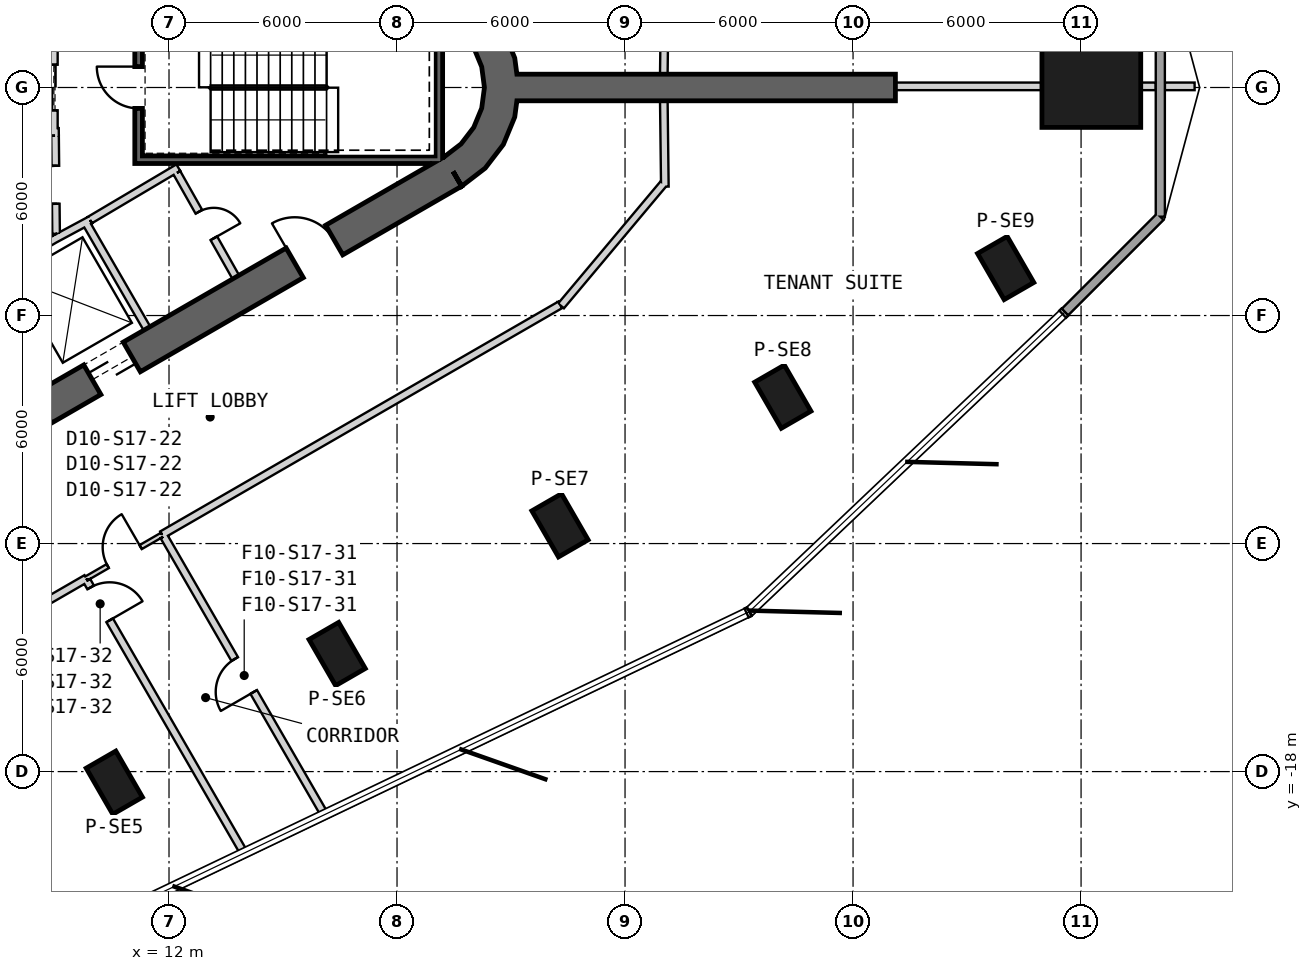
"""IFC4 building model, lengths in metres.
Left out: names, types, materials, properties, quantities, classifications, styles, units other than length and angle.
Written with IfcOpenShell. Run it as: python <this file> out.ifc"""

import sys

from ifc_helpers import new_model, si_unit, direction, frame, frame_2d, origin, origin_2d, place, context, subcontext, project, spatial, polyline, rectangle, outline, extrude, element, fill, save


model = new_model("IFC4")
c1 = context("Model", 3, precision=1e-05, world=origin(), true_north=direction((0.0, 1.0)))
c2 = subcontext(c1, "Body", "Model", "MODEL_VIEW")
j1 = project(units=[si_unit("LENGTHUNIT", "METRE"), si_unit("PLANEANGLEUNIT", "RADIAN")], contexts=[c1])
p1 = place(None, origin())
s1 = spatial("IfcSite", under=j1, at=p1, CompositionType="ELEMENT")
p2 = place(p1, origin())
s2 = spatial("IfcBuilding", under=s1, at=p2, CompositionType="ELEMENT")
p3 = place(p2, frame((0.0, 0.0, 265.2)))
s3 = spatial("IfcBuildingStorey", under=s2, at=p3, CompositionType="ELEMENT", Elevation=265.2)
p4 = place(p3, frame((36.27, 0.0, 0.0), z_axis=(0.0, 0.0, 1.0), x_axis=(1.0, 0.0, 0.0)))
e1 = element("IfcColumn", 1, at=p4, inside=s3, PredefinedType="COLUMN", context=c2, shape_type="SweptSolid", body=[
    extrude(rectangle(XDim=2.6, YDim=2.1, at=origin_2d()), origin(), (0.0, 0.0, 1.0), 4.0),
])
for number, where, z_axis, x_axis in (
    (2, (10.561, -18.292, 0.0), (0.0, 0.0, 1.0), (0.5, -0.866, 0.0)),
    (3, (16.425, -14.906, 0.0), (0.0, 0.0, 1.0), (0.5, -0.866, 0.0)),
    (4, (22.288, -11.521, 0.0), (0.0, 0.0, 1.0), (0.5, -0.866, 0.0)),
    (5, (28.152, -8.135, 0.0), (0.0, 0.0, 1.0), (0.5, -0.866, 0.0)),
    (6, (34.016, -4.75, 0.0), (0.0, 0.0, 1.0), (0.5, -0.866, 0.0)),
):
    element("IfcColumn", number, at=place(p3, frame(where, z_axis=z_axis, x_axis=x_axis)), inside=s3, PredefinedType="COLUMN", context=c2, shape_type="SweptSolid", body=[
        extrude(rectangle(XDim=1.4, YDim=0.9, at=origin_2d()), origin(), (0.0, 0.0, 1.0), 4.0),
    ])
p5 = place(p3, frame((-7.825, -17.97, 0.0), z_axis=(0.0, 0.0, 1.0), x_axis=(0.866028369851, 0.499994862586, 0.0)))
e7 = element("IfcWall", 7, at=p5, inside=s3, PredefinedType="SHEAR", context=c2, shape_type="SweptSolid", body=[
    extrude(rectangle(XDim=31.523, YDim=0.9, at=frame_2d((15.762, 0.0))), origin(), (0.0, 0.0, 1.0), 4.0),
])
p6 = place(p5, frame((7.062, 0.0, 0.0)))
e8 = element("IfcOpeningElement", 8, at=p6, cuts=e7, PredefinedType="OPENING", context=c2, shape_type="SweptSolid", body=[
    extrude(rectangle(XDim=1.2, YDim=2.4, at=frame_2d((0.6, 1.2))), frame((0.0, 0.46, 0.0), z_axis=(0.0, -1.0, 0.0), x_axis=(1.0, 0.0, 0.0)), (0.0, 0.0, 1.0), 0.92),
])
p7 = place(p5, frame((9.762, 0.0, 0.0)))
e9 = element("IfcOpeningElement", 9, at=p7, cuts=e7, PredefinedType="OPENING", context=c2, shape_type="SweptSolid", body=[
    extrude(rectangle(XDim=1.2, YDim=2.4, at=frame_2d((0.6, 1.2))), frame((0.0, 0.46, 0.0), z_axis=(0.0, -1.0, 0.0), x_axis=(1.0, 0.0, 0.0)), (0.0, 0.0, 1.0), 0.92),
])
p8 = place(p5, frame((12.462, 0.0, 0.0)))
e10 = element("IfcOpeningElement", 10, at=p8, cuts=e7, PredefinedType="OPENING", context=c2, shape_type="SweptSolid", body=[
    extrude(rectangle(XDim=1.2, YDim=2.4, at=frame_2d((0.6, 1.2))), frame((0.0, 0.46, 0.0), z_axis=(0.0, -1.0, 0.0), x_axis=(1.0, 0.0, 0.0)), (0.0, 0.0, 1.0), 0.92),
])
p9 = place(p5, frame((15.162, 0.0, 0.0)))
e11 = element("IfcOpeningElement", 11, at=p9, cuts=e7, PredefinedType="OPENING", context=c2, shape_type="SweptSolid", body=[
    extrude(rectangle(XDim=1.2, YDim=2.4, at=frame_2d((0.6, 1.2))), frame((0.0, 0.46, 0.0), z_axis=(0.0, -1.0, 0.0), x_axis=(1.0, 0.0, 0.0)), (0.0, 0.0, 1.0), 0.92),
])
p10 = place(p5, frame((17.862, 0.0, 0.0)))
e12 = element("IfcOpeningElement", 12, at=p10, cuts=e7, PredefinedType="OPENING", context=c2, shape_type="SweptSolid", body=[
    extrude(rectangle(XDim=1.2, YDim=2.4, at=frame_2d((0.6, 1.2))), frame((0.0, 0.46, 0.0), z_axis=(0.0, -1.0, 0.0), x_axis=(1.0, 0.0, 0.0)), (0.0, 0.0, 1.0), 0.92),
])
p11 = place(p5, frame((20.562, 0.0, 0.0)))
e13 = element("IfcOpeningElement", 13, at=p11, cuts=e7, PredefinedType="OPENING", context=c2, shape_type="SweptSolid", body=[
    extrude(rectangle(XDim=1.2, YDim=2.4, at=frame_2d((0.6, 1.2))), frame((0.0, 0.46, 0.0), z_axis=(0.0, -1.0, 0.0), x_axis=(1.0, 0.0, 0.0)), (0.0, 0.0, 1.0), 0.92),
])
p12 = place(p5, frame((26.712, 0.0, 0.0)))
e14 = element("IfcOpeningElement", 14, at=p12, cuts=e7, PredefinedType="OPENING", context=c2, shape_type="SweptSolid", body=[
    extrude(rectangle(XDim=1.2, YDim=2.4, at=frame_2d((0.6, 1.2))), frame((0.0, 0.46, 0.0), z_axis=(0.0, -1.0, 0.0), x_axis=(1.0, 0.0, 0.0)), (0.0, 0.0, 1.0), 0.92),
])
p13 = place(p5, frame((3.612, 0.0, 0.0)))
e15 = element("IfcOpeningElement", 15, at=p13, cuts=e7, PredefinedType="OPENING", context=c2, shape_type="SweptSolid", body=[
    extrude(rectangle(XDim=1.2, YDim=2.4, at=frame_2d((0.6, 1.2))), frame((0.0, 0.46, 0.0), z_axis=(0.0, -1.0, 0.0), x_axis=(1.0, 0.0, 0.0)), (0.0, 0.0, 1.0), 0.92),
])
p14 = place(p3, origin())
e16 = element("IfcWall", 16, at=p14, inside=s3, PredefinedType="SHEAR", context=c2, shape_type="SweptSolid", body=[
    extrude(outline(polyline([(19.7, -2.598), (20.321, -2.121), (20.798, -1.5), (21.098, -0.777), (21.2, 0.0), (21.098, 0.777), (20.798, 1.5), (20.321, 2.121), (19.7, 2.598), (19.25, 1.819), (19.685, 1.485), (20.019, 1.05), (20.229, 0.543), (20.3, 0.0), (20.229, -0.543), (20.019, -1.05), (19.685, -1.485), (19.25, -1.819), (19.7, -2.598)])), origin(), (0.0, 0.0, 1.0), 4.0),
])
p15 = place(p3, frame((21.15, 0.0, 0.0), z_axis=(0.0, 0.0, 1.0), x_axis=(1.0, 0.0, 0.0)))
e17 = element("IfcWall", 17, at=p15, inside=s3, PredefinedType="SHEAR", context=c2, shape_type="SweptSolid", body=[
    extrude(rectangle(XDim=9.965, YDim=0.7, at=frame_2d((4.982, 0.0))), origin(), (0.0, 0.0, 1.0), 4.0),
])
p16 = place(p3, frame((35.575, -5.909, 0.0), z_axis=(0.0, 0.0, 1.0), x_axis=(0.707106781187, 0.707106781187, 0.0)))
e18 = element("IfcWall", 18, at=p16, inside=s3, PredefinedType="SOLIDWALL", context=c2, shape_type="SweptSolid", body=[
    extrude(rectangle(XDim=3.55, YDim=0.24, at=frame_2d((1.775, 0.0))), origin(), (0.0, 0.0, 1.0), 3.7),
])
p17 = place(p3, frame((38.085, -3.399, 0.0), z_axis=(0.0, 0.0, 1.0), x_axis=(0.0, 1.0, 0.0)))
e19 = element("IfcWall", 19, at=p17, inside=s3, PredefinedType="SOLIDWALL", context=c2, shape_type="SweptSolid", body=[
    extrude(rectangle(XDim=6.798, YDim=0.24, at=frame_2d((3.399, 0.0))), origin(), (0.0, 0.0, 1.0), 3.7),
])
p18 = place(p3, frame((9.795, -3.525, 0.0), z_axis=(0.0, 0.0, 1.0), x_axis=(0.499984717929, -0.866034226713, 0.0)))
e20 = element("IfcWall", 20, at=p18, inside=s3, PredefinedType="PLUMBINGWALL", context=c2, shape_type="SweptSolid", body=[
    extrude(rectangle(XDim=3.25, YDim=0.2, at=frame_2d((1.625, 0.0))), origin(), (0.0, 0.0, 1.0), 3.7),
])
p19 = place(p3, frame((8.974, -3.999, 0.0), z_axis=(0.0, 0.0, 1.0), x_axis=(0.880907015104, 0.473289373154, 0.0)))
e21 = element("IfcWall", 21, at=p19, inside=s3, PredefinedType="PLUMBINGWALL", context=c2, shape_type="SweptSolid", body=[
    extrude(rectangle(XDim=1.078, YDim=0.2, at=frame_2d((0.539, 0.0))), origin(), (0.0, 0.0, 1.0), 3.7),
])
p20 = place(p3, frame((7.493, -4.878, 0.0), z_axis=(0.0, 0.0, 1.0), x_axis=(0.859981807212, 0.510324691999, 0.0)))
e22 = element("IfcWall", 22, at=p20, inside=s3, PredefinedType="PLUMBINGWALL", context=c2, shape_type="SweptSolid", body=[
    extrude(rectangle(XDim=1.845, YDim=0.2, at=frame_2d((0.922, 0.0))), origin(), (0.0, 0.0, 1.0), 3.7),
])
p21 = place(p3, frame((19.1, -2.0, -0.3), z_axis=(0.0, 0.0, 1.0), x_axis=(0.0, 1.0, 0.0)))
e23 = element("IfcWall", 23, at=p21, inside=s3, PredefinedType="SHEAR", context=c2, shape_type="SweptSolid", body=[
    extrude(rectangle(XDim=3.8, YDim=0.2, at=frame_2d((1.9, 0.0))), origin(), (0.0, 0.0, 1.0), 4.0),
])
p22 = place(p3, frame((11.1, -1.9, -0.3), z_axis=(0.0, 0.0, 1.0), x_axis=(1.0, 0.0, 0.0)))
e24 = element("IfcWall", 24, at=p22, inside=s3, PredefinedType="SHEAR", context=c2, shape_type="SweptSolid", body=[
    extrude(rectangle(XDim=7.9, YDim=0.2, at=frame_2d((3.95, 0.0))), origin(), (0.0, 0.0, 1.0), 4.0),
])
p23 = place(p3, frame((11.2, -1.8, -0.3), z_axis=(0.0, 0.0, 1.0), x_axis=(0.0, 1.0, 0.0)))
e25 = element("IfcWall", 25, at=p23, inside=s3, PredefinedType="SHEAR", context=c2, shape_type="SweptSolid", body=[
    extrude(rectangle(XDim=3.6, YDim=0.2, at=frame_2d((1.8, 0.0))), origin(), (0.0, 0.0, 1.0), 4.0),
])
p24 = place(p23, frame((1.25, 0.0, 0.3)))
e26 = element("IfcOpeningElement", 26, at=p24, cuts=e25, PredefinedType="OPENING", context=c2, shape_type="SweptSolid", body=[
    extrude(rectangle(XDim=1.1, YDim=2.1, at=frame_2d((0.55, 1.05))), frame((0.0, 0.11, 0.0), z_axis=(0.0, -1.0, 0.0), x_axis=(1.0, 0.0, 0.0)), (0.0, 0.0, 1.0), 0.22),
])
p25 = place(p3, frame((8.97, 1.2, 0.0), z_axis=(0.0, 0.0, 1.0), x_axis=(0.0, -1.0, 0.0)))
e27 = element("IfcWall", 27, at=p25, inside=s3, PredefinedType="PLUMBINGWALL", context=c2, shape_type="SweptSolid", body=[
    extrude(rectangle(XDim=2.4, YDim=0.2, at=frame_2d((1.2, 0.0))), origin(), (0.0, 0.0, 1.0), 3.7),
])
p26 = place(p25, frame((0.6, 0.0, 0.0)))
e28 = element("IfcOpeningElement", 28, at=p26, cuts=e27, PredefinedType="OPENING", context=c2, shape_type="SweptSolid", body=[
    extrude(rectangle(XDim=1.2, YDim=2.4, at=frame_2d((0.6, 1.2))), frame((0.0, 0.11, 0.0), z_axis=(0.0, -1.0, 0.0), x_axis=(1.0, 0.0, 0.0)), (0.0, 0.0, 1.0), 0.22),
])
p27 = place(p3, frame((5.9, -1.201, 0.0), z_axis=(0.0, 0.0, 1.0), x_axis=(0.999950064753, 0.009993397809, 0.0)))
e29 = element("IfcWall", 29, at=p27, inside=s3, PredefinedType="PLUMBINGWALL", context=c2, shape_type="SweptSolid", body=[
    extrude(rectangle(XDim=3.2, YDim=0.2, at=frame_2d((1.6, 0.0))), origin(), (0.0, 0.0, 1.0), 3.7),
])
p28 = place(p3, frame((12.245, -2.109, 0.0), z_axis=(0.0, 0.0, 1.0), x_axis=(-0.860414880418, -0.509594185166, 0.0)))
e30 = element("IfcWall", 30, at=p28, inside=s3, PredefinedType="PARTITIONING", context=c2, shape_type="SweptSolid", body=[
    extrude(rectangle(XDim=2.7, YDim=0.2, at=frame_2d((1.35, 0.0))), origin(), (0.0, 0.0, 1.0), 3.7),
])
p29 = place(p3, frame((13.758, -4.99, 0.0), z_axis=(0.0, 0.0, 1.0), x_axis=(-0.491993409184, 0.87059892334, 0.0)))
e31 = element("IfcWall", 31, at=p29, inside=s3, PredefinedType="PARTITIONING", context=c2, shape_type="SweptSolid", body=[
    extrude(rectangle(XDim=3.15, YDim=0.2, at=frame_2d((1.575, 0.0))), origin(), (0.0, 0.0, 1.0), 3.7),
])
p30 = place(p29, frame((1.175, 0.0, 0.0)))
e32 = element("IfcOpeningElement", 32, at=p30, cuts=e31, PredefinedType="OPENING", context=c2, shape_type="SweptSolid", body=[
    extrude(rectangle(XDim=0.8, YDim=2.1, at=frame_2d((0.4, 1.05))), frame((0.0, 0.11, 0.0), z_axis=(0.0, -1.0, 0.0), x_axis=(1.0, 0.0, 0.0)), (0.0, 0.0, 1.0), 0.22),
])
p31 = place(p3, frame((9.029, -3.851, 0.0), z_axis=(0.0, 0.0, 1.0), x_axis=(-0.010783593937, 0.99994185536, 0.0)))
e33 = element("IfcWall", 33, at=p31, inside=s3, PredefinedType="PARTITIONING", context=c2, shape_type="SweptSolid", body=[
    extrude(rectangle(XDim=2.581, YDim=0.2, at=frame_2d((1.291, 0.0))), origin(), (0.0, 0.0, 1.0), 3.7),
])
p32 = place(p31, frame((0.791, 0.0, 0.0)))
e34 = element("IfcOpeningElement", 34, at=p32, cuts=e33, PredefinedType="OPENING", context=c2, shape_type="SweptSolid", body=[
    extrude(rectangle(XDim=1.0, YDim=2.1, at=frame_2d((0.5, 1.05))), frame((0.0, 0.11, 0.0), z_axis=(0.0, -1.0, 0.0), x_axis=(1.0, 0.0, 0.0)), (0.0, 0.0, 1.0), 0.22),
])
p33 = place(p3, frame((25.021, 0.35, 0.0), z_axis=(0.0, 0.0, 1.0), x_axis=(0.012014998271, 0.999927817303, 0.0)))
e35 = element("IfcWall", 35, at=p33, inside=s3, PredefinedType="PARTITIONING", context=c2, shape_type="SweptSolid", body=[
    extrude(rectangle(XDim=2.093, YDim=0.2, at=frame_2d((1.046, 0.0))), origin(), (0.0, 0.0, 1.0), 3.7),
])
p34 = place(p3, frame((9.825, -12.918, 0.0), z_axis=(0.0, 0.0, 1.0), x_axis=(0.86602648383, 0.499998129301, 0.0)))
e36 = element("IfcWall", 36, at=p34, inside=s3, PredefinedType="PARTITIONING", context=c2, shape_type="SweptSolid", body=[
    extrude(rectangle(XDim=2.3, YDim=0.12, at=frame_2d((1.15, 0.0))), origin(), (0.0, 0.0, 1.0), 3.7),
])
p35 = place(p34, frame((0.65, 0.0, 0.0)))
e37 = element("IfcOpeningElement", 37, at=p35, cuts=e36, PredefinedType="OPENING", context=c2, shape_type="SweptSolid", body=[
    extrude(rectangle(XDim=1.0, YDim=2.1, at=frame_2d((0.5, 1.05))), frame((0.0, 0.07, 0.0), z_axis=(0.0, -1.0, 0.0), x_axis=(1.0, 0.0, 0.0)), (0.0, 0.0, 1.0), 0.14),
])
p36 = place(p3, frame((25.048, -2.608, 0.0), z_axis=(0.0, 0.0, 1.0), x_axis=(-0.012000433251, 0.999927992208, 0.0)))
e38 = element("IfcWall", 38, at=p36, inside=s3, PredefinedType="PARTITIONING", context=c2, shape_type="SweptSolid", body=[
    extrude(rectangle(XDim=2.258, YDim=0.2, at=frame_2d((1.129, 0.0))), origin(), (0.0, 0.0, 1.0), 3.7),
])
p37 = place(p3, frame((22.315, -5.746, 0.0), z_axis=(0.0, 0.0, 1.0), x_axis=(0.642828004621, 0.76601054593, 0.0)))
e39 = element("IfcWall", 39, at=p37, inside=s3, PredefinedType="PARTITIONING", context=c2, shape_type="SweptSolid", body=[
    extrude(rectangle(XDim=4.2, YDim=0.2, at=frame_2d((2.1, 0.0))), origin(), (0.0, 0.0, 1.0), 2.88),
])
p38 = place(p3, frame((-6.366, -22.266, 0.0), z_axis=(0.0, 0.0, 1.0), x_axis=(0.866027932408, 0.49999562027, 0.0)))
e40 = element("IfcWall", 40, at=p38, inside=s3, PredefinedType="PARTITIONING", context=c2, shape_type="SweptSolid", body=[
    extrude(rectangle(XDim=18.697, YDim=0.2, at=frame_2d((9.348, 0.0))), origin(), (0.0, 0.0, 1.0), 2.98),
])
p39 = place(p3, frame((11.817, -11.768, 0.0), z_axis=(0.0, 0.0, 1.0), x_axis=(0.866029971876, 0.49999208775, 0.0)))
e41 = element("IfcWall", 41, at=p39, inside=s3, PredefinedType="PARTITIONING", context=c2, shape_type="SweptSolid", body=[
    extrude(rectangle(XDim=12.096, YDim=0.2, at=frame_2d((6.048, 0.0))), origin(), (0.0, 0.0, 1.0), 2.98),
])
p40 = place(p3, frame((38.988, 0.03, 0.0), z_axis=(0.0, 0.0, 1.0), x_axis=(-1.0, 0.0, 0.0)))
e42 = element("IfcWall", 42, at=p40, inside=s3, PredefinedType="PARTITIONING", context=c2, shape_type="SweptSolid", body=[
    extrude(rectangle(XDim=0.783, YDim=0.2, at=frame_2d((0.392, 0.0))), origin(), (0.0, 0.0, 1.0), 3.7),
])
p41 = place(p3, frame((37.965, 0.03, 0.0), z_axis=(0.0, 0.0, 1.0), x_axis=(-1.0, 0.0, 0.0)))
e43 = element("IfcWall", 43, at=p41, inside=s3, PredefinedType="PARTITIONING", context=c2, shape_type="SweptSolid", body=[
    extrude(rectangle(XDim=0.395, YDim=0.2, at=frame_2d((0.197, 0.0))), origin(), (0.0, 0.0, 1.0), 3.7),
])
p42 = place(p3, frame((34.97, 0.03, 0.0), z_axis=(0.0, 0.0, 1.0), x_axis=(-1.0, 0.0, 0.0)))
e44 = element("IfcWall", 44, at=p42, inside=s3, PredefinedType="PARTITIONING", context=c2, shape_type="SweptSolid", body=[
    extrude(rectangle(XDim=3.856, YDim=0.2, at=frame_2d((1.928, 0.0))), origin(), (0.0, 0.0, 1.0), 3.27),
])
p43 = place(p3, frame((16.093, -19.134, 0.0), z_axis=(0.0, 0.0, 1.0), x_axis=(-0.500004849665, 0.866022603811, 0.0)))
e45 = element("IfcWall", 45, at=p43, inside=s3, PredefinedType="PARTITIONING", context=c2, shape_type="SweptSolid", body=[
    extrude(rectangle(XDim=8.457, YDim=0.2, at=frame_2d((4.228, 0.0))), origin(), (0.0, 0.0, 1.0), 3.7),
])
p44 = place(p43, frame((3.728, 0.0, 0.0)))
e46 = element("IfcOpeningElement", 46, at=p44, cuts=e45, PredefinedType="OPENING", context=c2, shape_type="SweptSolid", body=[
    extrude(rectangle(XDim=1.0, YDim=2.1, at=frame_2d((0.5, 1.05))), frame((0.0, 0.11, 0.0), z_axis=(0.0, -1.0, 0.0), x_axis=(1.0, 0.0, 0.0)), (0.0, 0.0, 1.0), 0.22),
])
p45 = place(p3, frame((9.838, -12.98, 0.0), z_axis=(0.0, 0.0, 1.0), x_axis=(0.499982124662, -0.866035723869, 0.0)))
e47 = element("IfcWall", 47, at=p45, inside=s3, PredefinedType="PARTITIONING", context=c2, shape_type="SweptSolid", body=[
    extrude(rectangle(XDim=8.274, YDim=0.2, at=frame_2d((4.137, 0.0))), origin(), (0.0, 0.0, 1.0), 3.7),
])
p46 = place(p45, frame((0.2, 0.0, 0.0)))
e48 = element("IfcOpeningElement", 48, at=p46, cuts=e47, PredefinedType="OPENING", context=c2, shape_type="SweptSolid", body=[
    extrude(rectangle(XDim=1.0, YDim=2.1, at=frame_2d((0.5, 1.05))), frame((0.0, 0.11, 0.0), z_axis=(0.0, -1.0, 0.0), x_axis=(1.0, 0.0, 0.0)), (0.0, 0.0, 1.0), 0.22),
])
p47 = place(p24, origin())
e49 = element("IfcDoor", 49, at=p47, inside=s3, OperationType="SINGLE_SWING_RIGHT", PredefinedType="USERDEFINED", context=c2, shape_type="SweptSolid", body=[
    extrude(rectangle(XDim=1.1, YDim=2.1, at=frame_2d((0.55, 1.05))), frame((0.0, 0.025, 0.0), z_axis=(0.0, -1.0, 0.0), x_axis=(1.0, 0.0, 0.0)), (0.0, 0.0, 1.0), 0.05),
])
fill(e26, e49)
p48 = place(p32, origin())
e50 = element("IfcDoor", 50, at=p48, inside=s3, OperationType="SINGLE_SWING_RIGHT", PredefinedType="USERDEFINED", context=c2, shape_type="SweptSolid", body=[
    extrude(rectangle(XDim=1.0, YDim=2.1, at=frame_2d((0.5, 1.05))), frame((0.0, 0.025, 0.0), z_axis=(0.0, -1.0, 0.0), x_axis=(1.0, 0.0, 0.0)), (0.0, 0.0, 1.0), 0.05),
])
fill(e34, e50)
p49 = place(p26, origin())
e51 = element("IfcDoor", 51, at=p49, inside=s3, OperationType="SLIDING_TO_LEFT", PredefinedType="USERDEFINED", context=c2, shape_type="SweptSolid", body=[
    extrude(rectangle(XDim=1.2, YDim=2.4, at=frame_2d((0.6, 1.2))), frame((0.0, 0.025, 0.0), z_axis=(0.0, -1.0, 0.0), x_axis=(1.0, 0.0, 0.0)), (0.0, 0.0, 1.0), 0.05),
])
fill(e28, e51)
p50 = place(p30, origin())
e52 = element("IfcDoor", 52, at=p50, inside=s3, OperationType="SINGLE_SWING_LEFT", PredefinedType="USERDEFINED", context=c2, shape_type="SweptSolid", body=[
    extrude(rectangle(XDim=0.8, YDim=2.1, at=frame_2d((0.4, 1.05))), frame((0.0, 0.025, 0.0), z_axis=(0.0, -1.0, 0.0), x_axis=(1.0, 0.0, 0.0)), (0.0, 0.0, 1.0), 0.05),
])
fill(e32, e52)
p51 = place(p35, origin())
e53 = element("IfcDoor", 53, at=p51, inside=s3, OperationType="SINGLE_SWING_RIGHT", PredefinedType="NOTDEFINED", context=c2, shape_type="SweptSolid", body=[
    extrude(rectangle(XDim=1.0, YDim=2.1, at=frame_2d((0.5, 1.05))), frame((0.0, 0.025, 0.0), z_axis=(0.0, -1.0, 0.0), x_axis=(1.0, 0.0, 0.0)), (0.0, 0.0, 1.0), 0.05),
])
fill(e37, e53)
p52 = place(p44, origin())
e54 = element("IfcDoor", 54, at=p52, inside=s3, OperationType="SINGLE_SWING_RIGHT", PredefinedType="USERDEFINED", context=c2, shape_type="SweptSolid", body=[
    extrude(rectangle(XDim=1.0, YDim=2.1, at=frame_2d((0.5, 1.05))), frame((0.0, 0.025, 0.0), z_axis=(0.0, -1.0, 0.0), x_axis=(1.0, 0.0, 0.0)), (0.0, 0.0, 1.0), 0.05),
])
fill(e46, e54)
p53 = place(p46, origin())
e55 = element("IfcDoor", 55, at=p53, inside=s3, OperationType="SINGLE_SWING_RIGHT", PredefinedType="USERDEFINED", context=c2, shape_type="SweptSolid", body=[
    extrude(rectangle(XDim=1.0, YDim=2.1, at=frame_2d((0.5, 1.05))), frame((0.0, 0.025, 0.0), z_axis=(0.0, -1.0, 0.0), x_axis=(1.0, 0.0, 0.0)), (0.0, 0.0, 1.0), 0.05),
])
fill(e48, e55)
p54 = place(p11, origin())
e56 = element("IfcDoor", 56, at=p54, inside=s3, OperationType="SLIDING_TO_LEFT", PredefinedType="USERDEFINED", context=c2, shape_type="SweptSolid", body=[
    extrude(rectangle(XDim=1.2, YDim=2.4, at=frame_2d((0.6, 1.2))), frame((0.0, 0.025, 0.0), z_axis=(0.0, -1.0, 0.0), x_axis=(1.0, 0.0, 0.0)), (0.0, 0.0, 1.0), 0.05),
])
fill(e13, e56)
p55 = place(p12, origin())
e57 = element("IfcDoor", 57, at=p55, inside=s3, OperationType="SINGLE_SWING_RIGHT", PredefinedType="USERDEFINED", context=c2, shape_type="SweptSolid", body=[
    extrude(rectangle(XDim=1.2, YDim=2.4, at=frame_2d((0.6, 1.2))), frame((0.0, 0.025, 0.0), z_axis=(0.0, -1.0, 0.0), x_axis=(1.0, 0.0, 0.0)), (0.0, 0.0, 1.0), 0.05),
])
fill(e14, e57)
save(model, sys.argv[1])
